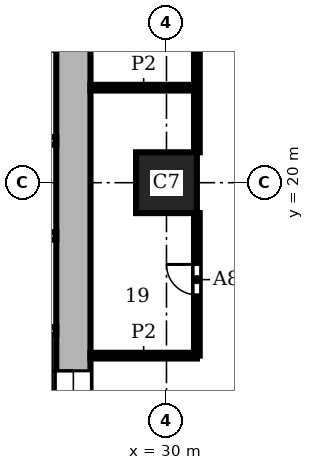
"""IFC4 building model, lengths in metres.
Left out: names, types, materials, properties, quantities, classifications, styles, units other than length and angle.
Written with IfcOpenShell. Run it as: python <this file> out.ifc"""

import sys

from ifc_helpers import new_model, si_unit, direction, frame, frame_2d, origin, origin_2d, place, context, subcontext, project, spatial, rectangle, extrude, element, fill, save


model = new_model("IFC4")
c1 = context("Model", 3, precision=1e-05, world=origin(), true_north=direction((0.0, 1.0)))
c2 = subcontext(c1, "Body", "Model", "MODEL_VIEW")
j1 = project(units=[si_unit("LENGTHUNIT", "METRE"), si_unit("PLANEANGLEUNIT", "RADIAN")], contexts=[c1])
p1 = place(None, origin())
s1 = spatial("IfcSite", under=j1, at=p1, CompositionType="ELEMENT")
p2 = place(p1, origin())
s2 = spatial("IfcBuilding", under=s1, at=p2, CompositionType="ELEMENT")
p3 = place(p2, frame((0.0, 0.0, 93.9)))
s3 = spatial("IfcBuildingStorey", under=s2, at=p3, CompositionType="ELEMENT", Elevation=93.9)
p4 = place(p3, frame((30.0, 20.0, 0.0), z_axis=(0.0, 0.0, 1.0), x_axis=(1.0, 0.0, 0.0)))
e1 = element("IfcColumn", 1, at=p4, inside=s3, PredefinedType="COLUMN", context=c2, shape_type="SweptSolid", body=[
    extrude(rectangle(XDim=1.6, YDim=1.6, at=origin_2d()), origin(), (0.0, 0.0, 1.0), 3.9),
])
p5 = place(p3, frame((27.55, 8.9, 0.0), z_axis=(0.0, 0.0, 1.0), x_axis=(0.0, 1.0, 0.0)))
e2 = element("IfcWall", 2, at=p5, inside=s3, PredefinedType="SHEAR", context=c2, shape_type="SweptSolid", body=[
    extrude(rectangle(XDim=18.2, YDim=0.9, at=frame_2d((9.1, 0.0))), origin(), (0.0, 0.0, 1.0), 3.9),
])
p6 = place(p5, frame((4.55, 0.0, 0.0)))
e3 = element("IfcOpeningElement", 3, at=p6, cuts=e2, PredefinedType="OPENING", context=c2, shape_type="SweptSolid", body=[
    extrude(rectangle(XDim=1.6, YDim=2.1, at=frame_2d((0.8, 1.05))), frame((0.0, 0.46, 0.0), z_axis=(0.0, -1.0, 0.0), x_axis=(1.0, 0.0, 0.0)), (0.0, 0.0, 1.0), 0.92),
])
for number, where, z_axis, x_axis in (
    (4, (24.3, 16.1, 0.0), (0.0, 0.0, 1.0), (1.0, 0.0, 0.0)),
    (5, (24.3, 18.6, 0.0), (0.0, 0.0, 1.0), (1.0, 0.0, 0.0)),
    (6, (24.3, 21.1, 0.0), (0.0, 0.0, 1.0), (1.0, 0.0, 0.0)),
):
    element("IfcWall", number, at=place(p3, frame(where, z_axis=z_axis, x_axis=x_axis)), inside=s3, PredefinedType="SHEAR", context=c2, shape_type="SweptSolid", body=[
        extrude(rectangle(XDim=2.8, YDim=0.2, at=frame_2d((1.4, 0.0))), origin(), (0.0, 0.0, 1.0), 3.58),
    ])
p7 = place(p3, frame((30.8, 15.45, 0.0), z_axis=(0.0, 0.0, 1.0), x_axis=(0.0, 1.0, 0.0)))
e7 = element("IfcWall", 7, at=p7, inside=s3, PredefinedType="PARTITIONING", context=c2, shape_type="SweptSolid", body=[
    extrude(rectangle(XDim=3.75, YDim=0.15, at=frame_2d((1.875, 0.0))), origin(), (0.0, 0.0, 1.0), 3.58),
])
p8 = place(p7, frame((1.6, 0.0, 0.0)))
e8 = element("IfcOpeningElement", 8, at=p8, cuts=e7, PredefinedType="OPENING", context=c2, shape_type="SweptSolid", body=[
    extrude(rectangle(XDim=0.8, YDim=2.1, at=frame_2d((0.4, 1.05))), frame((0.0, 0.085, 0.0), z_axis=(0.0, -1.0, 0.0), x_axis=(1.0, 0.0, 0.0)), (0.0, 0.0, 1.0), 0.17),
])
p9 = place(p3, frame((30.8, 20.8, 0.0), z_axis=(0.0, 0.0, 1.0), x_axis=(0.0, 1.0, 0.0)))
e9 = element("IfcWall", 9, at=p9, inside=s3, PredefinedType="PARTITIONING", context=c2, shape_type="SweptSolid", body=[
    extrude(rectangle(XDim=8.4, YDim=0.15, at=frame_2d((4.2, 0.0))), origin(), (0.0, 0.0, 1.0), 3.58),
])
p10 = place(p9, frame((4.3, 0.0, 0.0)))
e10 = element("IfcOpeningElement", 10, at=p10, cuts=e9, PredefinedType="OPENING", context=c2, shape_type="SweptSolid", body=[
    extrude(rectangle(XDim=1.1, YDim=2.1, at=frame_2d((0.55, 1.05))), frame((0.0, 0.085, 0.0), z_axis=(0.0, -1.0, 0.0), x_axis=(1.0, 0.0, 0.0)), (0.0, 0.0, 1.0), 0.17),
])
for number, where, z_axis, x_axis in (
    (11, (28.0, 15.45, 0.0), (0.0, 0.0, 1.0), (1.0, 0.0, 0.0)),
    (12, (28.0, 22.5, 0.0), (0.0, 0.0, 1.0), (1.0, 0.0, 0.0)),
):
    element("IfcWall", number, at=place(p3, frame(where, z_axis=z_axis, x_axis=x_axis)), inside=s3, PredefinedType="PARTITIONING", context=c2, shape_type="SweptSolid", body=[
        extrude(rectangle(XDim=2.8, YDim=0.15, at=frame_2d((1.4, 0.0))), origin(), (0.0, 0.0, 1.0), 3.58),
    ])
p11 = place(p6, origin())
e13 = element("IfcDoor", 13, at=p11, inside=s3, OperationType="DOUBLE_DOOR_SINGLE_SWING", PredefinedType="DOOR", context=c2, shape_type="SweptSolid", body=[
    extrude(rectangle(XDim=1.6, YDim=2.1, at=frame_2d((0.8, 1.05))), frame((0.0, 0.025, 0.0), z_axis=(0.0, -1.0, 0.0), x_axis=(1.0, 0.0, 0.0)), (0.0, 0.0, 1.0), 0.05),
])
fill(e3, e13)
p12 = place(p8, origin())
e14 = element("IfcDoor", 14, at=p12, inside=s3, OperationType="SINGLE_SWING_RIGHT", PredefinedType="DOOR", context=c2, shape_type="SweptSolid", body=[
    extrude(rectangle(XDim=0.8, YDim=2.1, at=frame_2d((0.4, 1.05))), frame((0.0, 0.025, 0.0), z_axis=(0.0, -1.0, 0.0), x_axis=(1.0, 0.0, 0.0)), (0.0, 0.0, 1.0), 0.05),
])
fill(e8, e14)
save(model, sys.argv[1])
